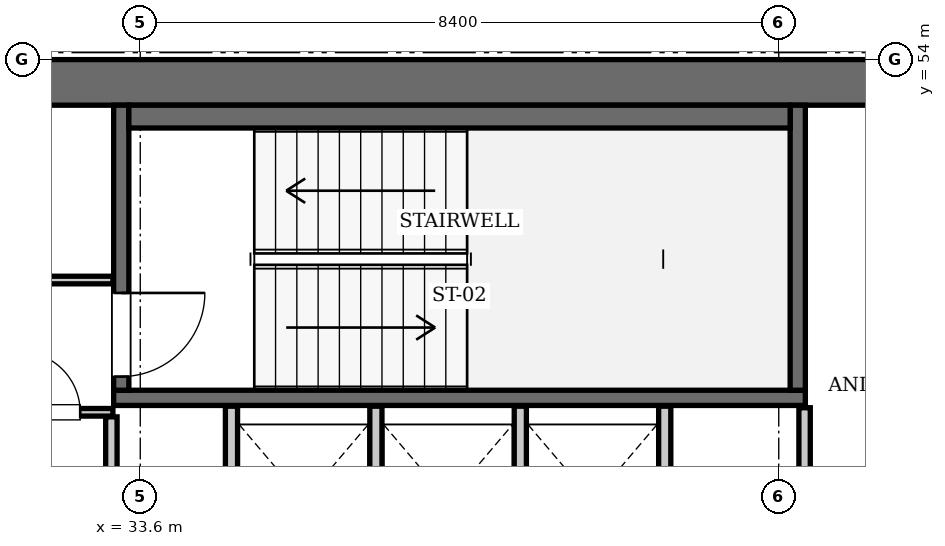
"""IFC4 building model, lengths in metres.
Left out: names, types, materials, properties, quantities, classifications, styles, units other than length and angle.
Written with IfcOpenShell. Run it as: python <this file> out.ifc"""

import sys

from ifc_helpers import new_model, si_unit, direction, frame, frame_2d, origin, place, context, subcontext, project, spatial, rectangle, extrude, element, fill, save


model = new_model("IFC4")
c1 = context("Model", 3, precision=1e-05, world=origin(), true_north=direction((0.0, 1.0)))
c2 = subcontext(c1, "Body", "Model", "MODEL_VIEW")
j1 = project(units=[si_unit("LENGTHUNIT", "METRE"), si_unit("PLANEANGLEUNIT", "RADIAN")], contexts=[c1])
p1 = place(None, origin())
s1 = spatial("IfcSite", under=j1, at=p1, CompositionType="ELEMENT")
p2 = place(p1, origin())
s2 = spatial("IfcBuilding", under=s1, at=p2, CompositionType="ELEMENT")
p3 = place(p2, frame((0.0, 0.0, 297.15)))
s3 = spatial("IfcBuildingStorey", under=s2, at=p3, CompositionType="ELEMENT", Elevation=297.15)
p4 = place(p3, frame((25.2, 53.7, 0.0), z_axis=(0.0, 0.0, 1.0), x_axis=(1.0, 0.0, 0.0)))
e1 = element("IfcWall", 1, at=p4, inside=s3, PredefinedType="SHEAR", context=c2, shape_type="SweptSolid", body=[
    extrude(rectangle(XDim=25.2, YDim=0.6, at=frame_2d((12.6, 0.0))), origin(), (0.0, 0.0, 1.0), 3.85),
])
p5 = place(p3, frame((33.25, 49.55, 0.0), z_axis=(0.0, 0.0, 1.0), x_axis=(1.0, 0.0, 0.0)))
e2 = element("IfcWall", 2, at=p5, inside=s3, PredefinedType="SOLIDWALL", context=c2, shape_type="SweptSolid", body=[
    extrude(rectangle(XDim=9.1, YDim=0.2, at=frame_2d((4.55, 0.0))), origin(), (0.0, 0.0, 1.0), 3.61),
])
p6 = place(p3, frame((42.25, 49.65, 0.0), z_axis=(0.0, 0.0, 1.0), x_axis=(0.0, 1.0, 0.0)))
e3 = element("IfcWall", 3, at=p6, inside=s3, PredefinedType="SOLIDWALL", context=c2, shape_type="SweptSolid", body=[
    extrude(rectangle(XDim=3.75, YDim=0.2, at=frame_2d((1.875, 0.0))), origin(), (0.0, 0.0, 1.0), 3.61),
])
p7 = place(p3, frame((33.35, 49.65, 0.0), z_axis=(0.0, 0.0, 1.0), x_axis=(0.0, 1.0, 0.0)))
e4 = element("IfcWall", 4, at=p7, inside=s3, PredefinedType="SOLIDWALL", context=c2, shape_type="SweptSolid", body=[
    extrude(rectangle(XDim=3.75, YDim=0.2, at=frame_2d((1.875, 0.0))), origin(), (0.0, 0.0, 1.0), 3.61),
])
p8 = place(p7, frame((0.18, 0.0, 0.0)))
e5 = element("IfcOpeningElement", 5, at=p8, cuts=e4, PredefinedType="OPENING", context=c2, shape_type="SweptSolid", body=[
    extrude(rectangle(XDim=1.1, YDim=2.15, at=frame_2d((0.55, 1.075))), frame((0.0, 0.11, 0.0), z_axis=(0.0, -1.0, 0.0), x_axis=(1.0, 0.0, 0.0)), (0.0, 0.0, 1.0), 0.22),
])
p9 = place(p3, frame((33.45, 53.25, 0.0), z_axis=(0.0, 0.0, 1.0), x_axis=(1.0, 0.0, 0.0)))
e6 = element("IfcWall", 6, at=p9, inside=s3, PredefinedType="SOLIDWALL", context=c2, shape_type="SweptSolid", body=[
    extrude(rectangle(XDim=8.7, YDim=0.3, at=frame_2d((4.35, 0.0))), origin(), (0.0, 0.0, 1.0), 3.61),
])
for number, where, z_axis, x_axis in (
    (7, (34.8, 47.25, 0.0), (0.0, 0.0, 1.0), (0.0, 1.0, 0.0)),
    (8, (36.7, 47.25, 0.0), (0.0, 0.0, 1.0), (0.0, 1.0, 0.0)),
    (9, (38.6, 47.25, 0.0), (0.0, 0.0, 1.0), (0.0, 1.0, 0.0)),
    (10, (40.5, 47.25, 0.0), (0.0, 0.0, 1.0), (0.0, 1.0, 0.0)),
):
    element("IfcWall", number, at=place(p3, frame(where, z_axis=z_axis, x_axis=x_axis)), inside=s3, PredefinedType="SOLIDWALL", context=c2, shape_type="SweptSolid", body=[
        extrude(rectangle(XDim=2.19, YDim=0.16, at=frame_2d((1.095, 0.0))), origin(), (0.0, 0.0, 1.0), 3.61),
    ])
p10 = place(p3, frame((33.22, 45.14, 0.0), z_axis=(0.0, 0.0, 1.0), x_axis=(0.0, 1.0, 0.0)))
e11 = element("IfcWall", 11, at=p10, inside=s3, PredefinedType="PARTITIONING", context=c2, shape_type="SweptSolid", body=[
    extrude(rectangle(XDim=4.16, YDim=0.15, at=frame_2d((2.08, 0.0))), origin(), (0.0, 0.0, 1.0), 3.61),
])
p11 = place(p3, frame((30.06, 49.36, 0.0), z_axis=(0.0, 0.0, 1.0), x_axis=(1.0, 0.0, 0.0)))
e12 = element("IfcWall", 12, at=p11, inside=s3, PredefinedType="PARTITIONING", context=c2, shape_type="SweptSolid", body=[
    extrude(rectangle(XDim=3.18, YDim=0.1, at=frame_2d((1.59, 0.0))), origin(), (0.0, 0.0, 1.0), 3.61),
])
p12 = place(p11, frame((1.95, 0.0, 0.0)))
e13 = element("IfcOpeningElement", 13, at=p12, cuts=e12, PredefinedType="OPENING", context=c2, shape_type="SweptSolid", body=[
    extrude(rectangle(XDim=0.8, YDim=2.05, at=frame_2d((0.4, 1.025))), frame((0.0, 0.06, 0.0), z_axis=(0.0, -1.0, 0.0), x_axis=(1.0, 0.0, 0.0)), (0.0, 0.0, 1.0), 0.12),
])
p13 = place(p3, frame((31.82, 51.1, 0.0), z_axis=(0.0, 0.0, 1.0), x_axis=(1.0, 0.0, 0.0)))
e14 = element("IfcWall", 14, at=p13, inside=s3, PredefinedType="PARTITIONING", context=c2, shape_type="SweptSolid", body=[
    extrude(rectangle(XDim=1.42, YDim=0.1, at=frame_2d((0.71, 0.0))), origin(), (0.0, 0.0, 1.0), 3.61),
])
p14 = place(p3, frame((42.34, 46.96, 0.0), z_axis=(0.0, 0.0, 1.0), x_axis=(0.0, 1.0, 0.0)))
e15 = element("IfcWall", 15, at=p14, inside=s3, PredefinedType="PARTITIONING", context=c2, shape_type="SweptSolid", body=[
    extrude(rectangle(XDim=2.46, YDim=0.15, at=frame_2d((1.23, 0.0))), origin(), (0.0, 0.0, 1.0), 3.61),
])
p15 = place(p14, frame((0.24, 0.0, 0.0)))
e16 = element("IfcOpeningElement", 16, at=p15, cuts=e15, PredefinedType="OPENING", context=c2, shape_type="SweptSolid", body=[
    extrude(rectangle(XDim=0.8, YDim=2.05, at=frame_2d((0.4, 1.025))), frame((0.0, 0.085, 0.0), z_axis=(0.0, -1.0, 0.0), x_axis=(1.0, 0.0, 0.0)), (0.0, 0.0, 1.0), 0.17),
])
p16 = place(p8, frame((1.1, 0.0, 0.0), z_axis=(0.0, 0.0, 1.0), x_axis=(-1.0, 0.0, 0.0)))
e17 = element("IfcDoor", 17, at=p16, inside=s3, OperationType="SINGLE_SWING_LEFT", PredefinedType="DOOR", context=c2, shape_type="SweptSolid", body=[
    extrude(rectangle(XDim=1.1, YDim=2.15, at=frame_2d((0.55, 1.075))), frame((0.0, 0.025, 0.0), z_axis=(0.0, -1.0, 0.0), x_axis=(1.0, 0.0, 0.0)), (0.0, 0.0, 1.0), 0.05),
])
fill(e5, e17)
p17 = place(p12, origin())
e18 = element("IfcDoor", 18, at=p17, inside=s3, OperationType="SINGLE_SWING_LEFT", PredefinedType="DOOR", context=c2, shape_type="SweptSolid", body=[
    extrude(rectangle(XDim=0.8, YDim=2.05, at=frame_2d((0.4, 1.025))), frame((0.0, 0.025, 0.0), z_axis=(0.0, -1.0, 0.0), x_axis=(1.0, 0.0, 0.0)), (0.0, 0.0, 1.0), 0.05),
])
fill(e13, e18)
save(model, sys.argv[1])
